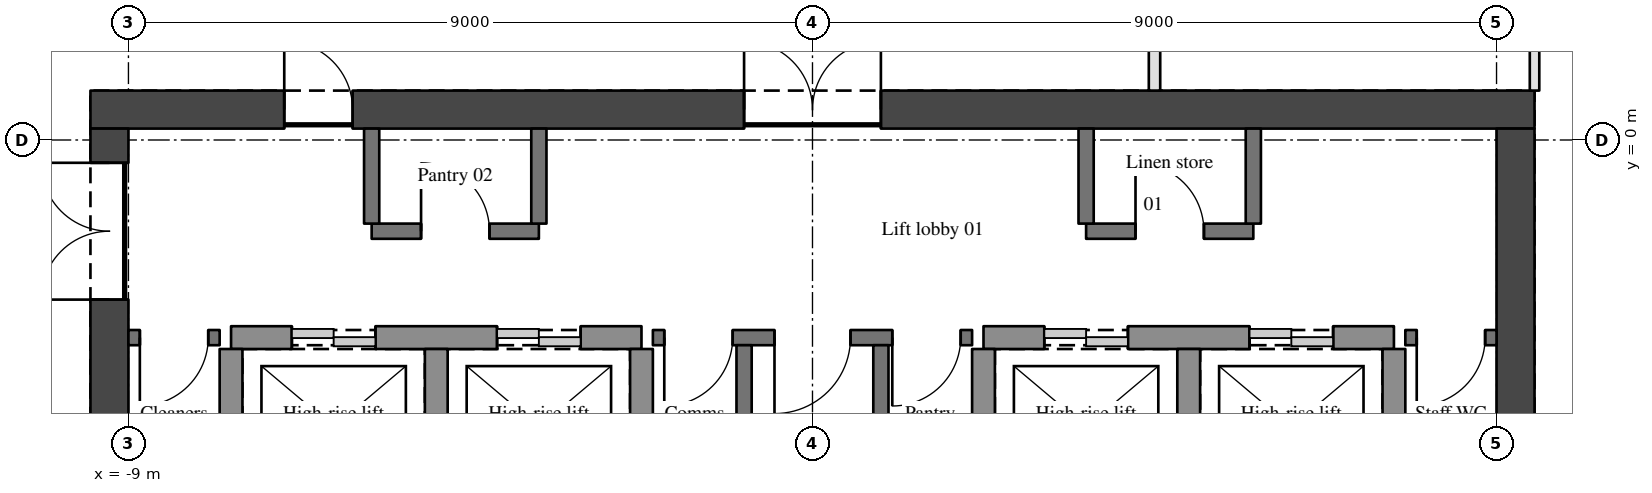
"""IFC4 building model, lengths in metres.
Left out: names, types, materials, properties, quantities, classifications, styles, units other than length and angle.
Written with IfcOpenShell. Run it as: python <this file> out.ifc"""

import sys

from ifc_helpers import new_model, si_unit, direction, frame, frame_2d, origin, place, context, subcontext, project, spatial, rectangle, extrude, element, fill, save


model = new_model("IFC4")
c1 = context("Model", 3, precision=1e-05, world=origin(), true_north=direction((0.0, 1.0)))
c2 = subcontext(c1, "Body", "Model", "MODEL_VIEW")
j1 = project(units=[si_unit("LENGTHUNIT", "METRE"), si_unit("PLANEANGLEUNIT", "RADIAN")], contexts=[c1])
p1 = place(None, origin())
s1 = spatial("IfcSite", under=j1, at=p1, CompositionType="ELEMENT")
p2 = place(p1, origin())
s2 = spatial("IfcBuilding", under=s1, at=p2, CompositionType="ELEMENT")
p3 = place(p2, frame((0.0, 0.0, 217.2)))
s3 = spatial("IfcBuildingStorey", under=s2, at=p3, CompositionType="ELEMENT", Elevation=217.2)
p4 = place(p3, frame((-9.5, 0.4, 0.0), z_axis=(0.0, 0.0, 1.0), x_axis=(1.0, 0.0, 0.0)))
e1 = element("IfcWall", 1, at=p4, inside=s3, PredefinedType="SHEAR", context=c2, shape_type="SweptSolid", body=[
    extrude(rectangle(XDim=19.0, YDim=0.5, at=frame_2d((9.5, 0.0))), origin(), (0.0, 0.0, 1.0), 3.15),
])
p5 = place(p4, frame((8.6, 0.0, 0.0)))
e2 = element("IfcOpeningElement", 2, at=p5, cuts=e1, PredefinedType="OPENING", context=c2, shape_type="SweptSolid", body=[
    extrude(rectangle(XDim=1.8, YDim=2.1, at=frame_2d((0.9, 1.05))), frame((0.0, 0.26, 0.0), z_axis=(0.0, -1.0, 0.0), x_axis=(1.0, 0.0, 0.0)), (0.0, 0.0, 1.0), 0.52),
])
p6 = place(p4, frame((2.55, 0.0, 0.0)))
e3 = element("IfcOpeningElement", 3, at=p6, cuts=e1, PredefinedType="OPENING", context=c2, shape_type="SweptSolid", body=[
    extrude(rectangle(XDim=0.9, YDim=2.1, at=frame_2d((0.45, 1.05))), frame((0.0, 0.26, 0.0), z_axis=(0.0, -1.0, 0.0), x_axis=(1.0, 0.0, 0.0)), (0.0, 0.0, 1.0), 0.52),
])
p7 = place(p3, frame((-9.25, -11.5, 0.0), z_axis=(0.0, 0.0, 1.0), x_axis=(0.0, 1.0, 0.0)))
e4 = element("IfcWall", 4, at=p7, inside=s3, PredefinedType="SHEAR", context=c2, shape_type="SweptSolid", body=[
    extrude(rectangle(XDim=11.65, YDim=0.5, at=frame_2d((5.825, 0.0))), origin(), (0.0, 0.0, 1.0), 3.15),
])
p8 = place(p7, frame((9.4, 0.0, 0.0)))
e5 = element("IfcOpeningElement", 5, at=p8, cuts=e4, PredefinedType="OPENING", context=c2, shape_type="SweptSolid", body=[
    extrude(rectangle(XDim=1.8, YDim=2.1, at=frame_2d((0.9, 1.05))), frame((0.0, 0.26, 0.0), z_axis=(0.0, -1.0, 0.0), x_axis=(1.0, 0.0, 0.0)), (0.0, 0.0, 1.0), 0.52),
])
p9 = place(p3, frame((9.25, -11.5, 0.0), z_axis=(0.0, 0.0, 1.0), x_axis=(0.0, 1.0, 0.0)))
e6 = element("IfcWall", 6, at=p9, inside=s3, PredefinedType="SHEAR", context=c2, shape_type="SweptSolid", body=[
    extrude(rectangle(XDim=11.65, YDim=0.5, at=frame_2d((5.825, 0.0))), origin(), (0.0, 0.0, 1.0), 3.15),
])
p10 = place(p3, frame((-7.8, -2.6, 0.0), z_axis=(0.0, 0.0, 1.0), x_axis=(-1.0, 0.0, 0.0)))
e7 = element("IfcWall", 7, at=p10, inside=s3, PredefinedType="SOLIDWALL", context=c2, shape_type="SweptSolid", body=[
    extrude(rectangle(XDim=1.2, YDim=0.2, at=frame_2d((0.6, 0.0))), origin(), (0.0, 0.0, 1.0), 2.85),
])
p11 = place(p10, frame((0.15, 0.0, 0.0)))
e8 = element("IfcOpeningElement", 8, at=p11, cuts=e7, PredefinedType="OPENING", context=c2, shape_type="SweptSolid", body=[
    extrude(rectangle(XDim=0.9, YDim=2.1, at=frame_2d((0.45, 1.05))), frame((0.0, 0.11, 0.0), z_axis=(0.0, -1.0, 0.0), x_axis=(1.0, 0.0, 0.0)), (0.0, 0.0, 1.0), 0.22),
])
p12 = place(p3, frame((-7.65, -2.6, 0.0), z_axis=(0.0, 0.0, 1.0), x_axis=(1.0, 0.0, 0.0)))
e9 = element("IfcWall", 9, at=p12, inside=s3, PredefinedType="SHEAR", context=c2, shape_type="SweptSolid", body=[
    extrude(rectangle(XDim=5.4, YDim=0.3, at=frame_2d((2.7, 0.0))), origin(), (0.0, 0.0, 1.0), 3.15),
])
p13 = place(p12, frame((0.8, 0.0, 0.0)))
e10 = element("IfcOpeningElement", 10, at=p13, cuts=e9, PredefinedType="OPENING", context=c2, shape_type="SweptSolid", body=[
    extrude(rectangle(XDim=1.1, YDim=2.1, at=frame_2d((0.55, 1.05))), frame((0.0, 0.16, 0.0), z_axis=(0.0, -1.0, 0.0), x_axis=(1.0, 0.0, 0.0)), (0.0, 0.0, 1.0), 0.32),
])
p14 = place(p12, frame((3.5, 0.0, 0.0)))
e11 = element("IfcOpeningElement", 11, at=p14, cuts=e9, PredefinedType="OPENING", context=c2, shape_type="SweptSolid", body=[
    extrude(rectangle(XDim=1.1, YDim=2.1, at=frame_2d((0.55, 1.05))), frame((0.0, 0.16, 0.0), z_axis=(0.0, -1.0, 0.0), x_axis=(1.0, 0.0, 0.0)), (0.0, 0.0, 1.0), 0.32),
])
p15 = place(p3, frame((2.1, -2.6, 0.0), z_axis=(0.0, 0.0, 1.0), x_axis=(-1.0, 0.0, 0.0)))
e12 = element("IfcWall", 12, at=p15, inside=s3, PredefinedType="SOLIDWALL", context=c2, shape_type="SweptSolid", body=[
    extrude(rectangle(XDim=4.2, YDim=0.2, at=frame_2d((2.1, 0.0))), origin(), (0.0, 0.0, 1.0), 2.85),
])
p16 = place(p15, frame((1.6, 0.0, 0.0)))
e13 = element("IfcOpeningElement", 13, at=p16, cuts=e12, PredefinedType="OPENING", context=c2, shape_type="SweptSolid", body=[
    extrude(rectangle(XDim=1.0, YDim=2.1, at=frame_2d((0.5, 1.05))), frame((0.0, 0.11, 0.0), z_axis=(0.0, -1.0, 0.0), x_axis=(1.0, 0.0, 0.0)), (0.0, 0.0, 1.0), 0.22),
])
p17 = place(p15, frame((3.15, 0.0, 0.0)))
e14 = element("IfcOpeningElement", 14, at=p17, cuts=e12, PredefinedType="OPENING", context=c2, shape_type="SweptSolid", body=[
    extrude(rectangle(XDim=0.9, YDim=2.1, at=frame_2d((0.45, 1.05))), frame((0.0, 0.11, 0.0), z_axis=(0.0, -1.0, 0.0), x_axis=(1.0, 0.0, 0.0)), (0.0, 0.0, 1.0), 0.22),
])
p18 = place(p15, frame((0.15, 0.0, 0.0)))
e15 = element("IfcOpeningElement", 15, at=p18, cuts=e12, PredefinedType="OPENING", context=c2, shape_type="SweptSolid", body=[
    extrude(rectangle(XDim=0.9, YDim=2.1, at=frame_2d((0.45, 1.05))), frame((0.0, 0.11, 0.0), z_axis=(0.0, -1.0, 0.0), x_axis=(1.0, 0.0, 0.0)), (0.0, 0.0, 1.0), 0.22),
])
p19 = place(p3, frame((2.25, -2.6, 0.0), z_axis=(0.0, 0.0, 1.0), x_axis=(1.0, 0.0, 0.0)))
e16 = element("IfcWall", 16, at=p19, inside=s3, PredefinedType="SHEAR", context=c2, shape_type="SweptSolid", body=[
    extrude(rectangle(XDim=5.4, YDim=0.3, at=frame_2d((2.7, 0.0))), origin(), (0.0, 0.0, 1.0), 3.15),
])
p20 = place(p19, frame((0.8, 0.0, 0.0)))
e17 = element("IfcOpeningElement", 17, at=p20, cuts=e16, PredefinedType="OPENING", context=c2, shape_type="SweptSolid", body=[
    extrude(rectangle(XDim=1.1, YDim=2.1, at=frame_2d((0.55, 1.05))), frame((0.0, 0.16, 0.0), z_axis=(0.0, -1.0, 0.0), x_axis=(1.0, 0.0, 0.0)), (0.0, 0.0, 1.0), 0.32),
])
p21 = place(p19, frame((3.5, 0.0, 0.0)))
e18 = element("IfcOpeningElement", 18, at=p21, cuts=e16, PredefinedType="OPENING", context=c2, shape_type="SweptSolid", body=[
    extrude(rectangle(XDim=1.1, YDim=2.1, at=frame_2d((0.55, 1.05))), frame((0.0, 0.16, 0.0), z_axis=(0.0, -1.0, 0.0), x_axis=(1.0, 0.0, 0.0)), (0.0, 0.0, 1.0), 0.32),
])
p22 = place(p3, frame((9.0, -2.6, 0.0), z_axis=(0.0, 0.0, 1.0), x_axis=(-1.0, 0.0, 0.0)))
e19 = element("IfcWall", 19, at=p22, inside=s3, PredefinedType="SOLIDWALL", context=c2, shape_type="SweptSolid", body=[
    extrude(rectangle(XDim=1.2, YDim=0.2, at=frame_2d((0.6, 0.0))), origin(), (0.0, 0.0, 1.0), 2.85),
])
p23 = place(p22, frame((0.15, 0.0, 0.0)))
e20 = element("IfcOpeningElement", 20, at=p23, cuts=e19, PredefinedType="OPENING", context=c2, shape_type="SweptSolid", body=[
    extrude(rectangle(XDim=0.9, YDim=2.1, at=frame_2d((0.45, 1.05))), frame((0.0, 0.11, 0.0), z_axis=(0.0, -1.0, 0.0), x_axis=(1.0, 0.0, 0.0)), (0.0, 0.0, 1.0), 0.22),
])
p24 = place(p3, frame((-5.8, -1.2, 0.0), z_axis=(0.0, 0.0, 1.0), x_axis=(1.0, 0.0, 0.0)))
e21 = element("IfcWall", 21, at=p24, inside=s3, PredefinedType="SOLIDWALL", context=c2, shape_type="SweptSolid", body=[
    extrude(rectangle(XDim=2.2, YDim=0.2, at=frame_2d((1.1, 0.0))), origin(), (0.0, 0.0, 1.0), 2.85),
])
p25 = place(p24, frame((0.65, 0.0, 0.0)))
e22 = element("IfcOpeningElement", 22, at=p25, cuts=e21, PredefinedType="OPENING", context=c2, shape_type="SweptSolid", body=[
    extrude(rectangle(XDim=0.9, YDim=2.1, at=frame_2d((0.45, 1.05))), frame((0.0, 0.11, 0.0), z_axis=(0.0, -1.0, 0.0), x_axis=(1.0, 0.0, 0.0)), (0.0, 0.0, 1.0), 0.22),
])
p26 = place(p3, frame((3.6, -1.2, 0.0), z_axis=(0.0, 0.0, 1.0), x_axis=(1.0, 0.0, 0.0)))
e23 = element("IfcWall", 23, at=p26, inside=s3, PredefinedType="SOLIDWALL", context=c2, shape_type="SweptSolid", body=[
    extrude(rectangle(XDim=2.2, YDim=0.2, at=frame_2d((1.1, 0.0))), origin(), (0.0, 0.0, 1.0), 2.85),
])
p27 = place(p26, frame((0.65, 0.0, 0.0)))
e24 = element("IfcOpeningElement", 24, at=p27, cuts=e23, PredefinedType="OPENING", context=c2, shape_type="SweptSolid", body=[
    extrude(rectangle(XDim=0.9, YDim=2.1, at=frame_2d((0.45, 1.05))), frame((0.0, 0.11, 0.0), z_axis=(0.0, -1.0, 0.0), x_axis=(1.0, 0.0, 0.0)), (0.0, 0.0, 1.0), 0.22),
])
p28 = place(p3, frame((-7.65, -4.8, 0.0), z_axis=(0.0, 0.0, 1.0), x_axis=(0.0, 1.0, 0.0)))
e25 = element("IfcWall", 25, at=p28, inside=s3, PredefinedType="SHEAR", context=c2, shape_type="SweptSolid", body=[
    extrude(rectangle(XDim=2.05, YDim=0.3, at=frame_2d((1.025, 0.0))), origin(), (0.0, 0.0, 1.0), 3.15),
])
p29 = place(p3, frame((-5.8, -1.1, 0.0), z_axis=(0.0, 0.0, 1.0), x_axis=(0.0, 1.0, 0.0)))
e26 = element("IfcWall", 26, at=p29, inside=s3, PredefinedType="SOLIDWALL", context=c2, shape_type="SweptSolid", body=[
    extrude(rectangle(XDim=1.25, YDim=0.2, at=frame_2d((0.625, 0.0))), origin(), (0.0, 0.0, 1.0), 2.85),
])
p30 = place(p3, frame((-4.95, -4.8, 0.0), z_axis=(0.0, 0.0, 1.0), x_axis=(0.0, 1.0, 0.0)))
e27 = element("IfcWall", 27, at=p30, inside=s3, PredefinedType="SHEAR", context=c2, shape_type="SweptSolid", body=[
    extrude(rectangle(XDim=2.05, YDim=0.3, at=frame_2d((1.025, 0.0))), origin(), (0.0, 0.0, 1.0), 3.15),
])
p31 = place(p3, frame((-3.6, -1.1, 0.0), z_axis=(0.0, 0.0, 1.0), x_axis=(0.0, 1.0, 0.0)))
e28 = element("IfcWall", 28, at=p31, inside=s3, PredefinedType="SOLIDWALL", context=c2, shape_type="SweptSolid", body=[
    extrude(rectangle(XDim=1.25, YDim=0.2, at=frame_2d((0.625, 0.0))), origin(), (0.0, 0.0, 1.0), 2.85),
])
p32 = place(p3, frame((-2.25, -4.8, 0.0), z_axis=(0.0, 0.0, 1.0), x_axis=(0.0, 1.0, 0.0)))
e29 = element("IfcWall", 29, at=p32, inside=s3, PredefinedType="SHEAR", context=c2, shape_type="SweptSolid", body=[
    extrude(rectangle(XDim=2.05, YDim=0.3, at=frame_2d((1.025, 0.0))), origin(), (0.0, 0.0, 1.0), 3.15),
])
for number, where, z_axis, x_axis in (
    (30, (-0.9, -4.85, 0.0), (0.0, 0.0, 1.0), (0.0, 1.0, 0.0)),
    (31, (0.9, -4.85, 0.0), (0.0, 0.0, 1.0), (0.0, 1.0, 0.0)),
):
    element("IfcWall", number, at=place(p3, frame(where, z_axis=z_axis, x_axis=x_axis)), inside=s3, PredefinedType="SOLIDWALL", context=c2, shape_type="SweptSolid", body=[
        extrude(rectangle(XDim=2.15, YDim=0.2, at=frame_2d((1.075, 0.0))), origin(), (0.0, 0.0, 1.0), 2.85),
    ])
p33 = place(p3, frame((2.25, -4.8, 0.0), z_axis=(0.0, 0.0, 1.0), x_axis=(0.0, 1.0, 0.0)))
e32 = element("IfcWall", 32, at=p33, inside=s3, PredefinedType="SHEAR", context=c2, shape_type="SweptSolid", body=[
    extrude(rectangle(XDim=2.05, YDim=0.3, at=frame_2d((1.025, 0.0))), origin(), (0.0, 0.0, 1.0), 3.15),
])
p34 = place(p3, frame((3.6, -1.1, 0.0), z_axis=(0.0, 0.0, 1.0), x_axis=(0.0, 1.0, 0.0)))
e33 = element("IfcWall", 33, at=p34, inside=s3, PredefinedType="SOLIDWALL", context=c2, shape_type="SweptSolid", body=[
    extrude(rectangle(XDim=1.25, YDim=0.2, at=frame_2d((0.625, 0.0))), origin(), (0.0, 0.0, 1.0), 2.85),
])
p35 = place(p3, frame((4.5, 5.325, 0.0), z_axis=(0.0, 0.0, 1.0), x_axis=(0.0, -1.0, 0.0)))
e34 = element("IfcWall", 34, at=p35, inside=s3, PredefinedType="PARTITIONING", context=c2, shape_type="SweptSolid", body=[
    extrude(rectangle(XDim=4.675, YDim=0.15, at=frame_2d((2.337, 0.0))), origin(), (0.0, 0.0, 1.0), 2.21),
])
p36 = place(p35, frame((1.85, 0.0, 0.0)))
e35 = element("IfcOpeningElement", 35, at=p36, cuts=e34, PredefinedType="OPENING", context=c2, shape_type="SweptSolid", body=[
    extrude(rectangle(XDim=0.9, YDim=2.1, at=frame_2d((0.45, 1.05))), frame((0.0, 0.085, 0.0), z_axis=(0.0, -1.0, 0.0), x_axis=(1.0, 0.0, 0.0)), (0.0, 0.0, 1.0), 0.17),
])
p37 = place(p3, frame((4.95, -4.8, 0.0), z_axis=(0.0, 0.0, 1.0), x_axis=(0.0, 1.0, 0.0)))
e36 = element("IfcWall", 36, at=p37, inside=s3, PredefinedType="SHEAR", context=c2, shape_type="SweptSolid", body=[
    extrude(rectangle(XDim=2.05, YDim=0.3, at=frame_2d((1.025, 0.0))), origin(), (0.0, 0.0, 1.0), 3.15),
])
p38 = place(p3, frame((5.8, -1.1, 0.0), z_axis=(0.0, 0.0, 1.0), x_axis=(0.0, 1.0, 0.0)))
e37 = element("IfcWall", 37, at=p38, inside=s3, PredefinedType="SOLIDWALL", context=c2, shape_type="SweptSolid", body=[
    extrude(rectangle(XDim=1.25, YDim=0.2, at=frame_2d((0.625, 0.0))), origin(), (0.0, 0.0, 1.0), 2.85),
])
p39 = place(p3, frame((7.65, -4.8, 0.0), z_axis=(0.0, 0.0, 1.0), x_axis=(0.0, 1.0, 0.0)))
e38 = element("IfcWall", 38, at=p39, inside=s3, PredefinedType="SHEAR", context=c2, shape_type="SweptSolid", body=[
    extrude(rectangle(XDim=2.05, YDim=0.3, at=frame_2d((1.025, 0.0))), origin(), (0.0, 0.0, 1.0), 3.15),
])
p40 = place(p3, frame((9.5, 0.65, 0.0), z_axis=(0.0, 0.0, 1.0), x_axis=(0.0, 1.0, 0.0)))
e39 = element("IfcWall", 39, at=p40, inside=s3, PredefinedType="PARTITIONING", context=c2, shape_type="SweptSolid", body=[
    extrude(rectangle(XDim=8.85, YDim=0.125, at=frame_2d((4.425, 0.0))), origin(), (0.0, 0.0, 1.0), 2.21),
])
p41 = place(p8, origin())
e40 = element("IfcDoor", 40, at=p41, inside=s3, OperationType="DOUBLE_DOOR_SINGLE_SWING", PredefinedType="DOOR", context=c2, shape_type="SweptSolid", body=[
    extrude(rectangle(XDim=1.8, YDim=2.1, at=frame_2d((0.9, 1.05))), frame((0.0, 0.025, 0.0), z_axis=(0.0, -1.0, 0.0), x_axis=(1.0, 0.0, 0.0)), (0.0, 0.0, 1.0), 0.05),
])
fill(e5, e40)
p42 = place(p5, origin())
e41 = element("IfcDoor", 41, at=p42, inside=s3, OperationType="DOUBLE_DOOR_SINGLE_SWING", PredefinedType="DOOR", context=c2, shape_type="SweptSolid", body=[
    extrude(rectangle(XDim=1.8, YDim=2.1, at=frame_2d((0.9, 1.05))), frame((0.0, 0.025, 0.0), z_axis=(0.0, -1.0, 0.0), x_axis=(1.0, 0.0, 0.0)), (0.0, 0.0, 1.0), 0.05),
])
fill(e2, e41)
p43 = place(p16, origin())
e42 = element("IfcDoor", 42, at=p43, inside=s3, OperationType="SINGLE_SWING_RIGHT", PredefinedType="DOOR", context=c2, shape_type="SweptSolid", body=[
    extrude(rectangle(XDim=1.0, YDim=2.1, at=frame_2d((0.5, 1.05))), frame((0.0, 0.025, 0.0), z_axis=(0.0, -1.0, 0.0), x_axis=(1.0, 0.0, 0.0)), (0.0, 0.0, 1.0), 0.05),
])
fill(e13, e42)
p44 = place(p17, origin())
e43 = element("IfcDoor", 43, at=p44, inside=s3, OperationType="SINGLE_SWING_RIGHT", PredefinedType="DOOR", context=c2, shape_type="SweptSolid", body=[
    extrude(rectangle(XDim=0.9, YDim=2.1, at=frame_2d((0.45, 1.05))), frame((0.0, 0.025, 0.0), z_axis=(0.0, -1.0, 0.0), x_axis=(1.0, 0.0, 0.0)), (0.0, 0.0, 1.0), 0.05),
])
fill(e14, e43)
p45 = place(p18, origin())
e44 = element("IfcDoor", 44, at=p45, inside=s3, OperationType="SINGLE_SWING_RIGHT", PredefinedType="DOOR", context=c2, shape_type="SweptSolid", body=[
    extrude(rectangle(XDim=0.9, YDim=2.1, at=frame_2d((0.45, 1.05))), frame((0.0, 0.025, 0.0), z_axis=(0.0, -1.0, 0.0), x_axis=(1.0, 0.0, 0.0)), (0.0, 0.0, 1.0), 0.05),
])
fill(e15, e44)
p46 = place(p23, origin())
e45 = element("IfcDoor", 45, at=p46, inside=s3, OperationType="SINGLE_SWING_RIGHT", PredefinedType="DOOR", context=c2, shape_type="SweptSolid", body=[
    extrude(rectangle(XDim=0.9, YDim=2.1, at=frame_2d((0.45, 1.05))), frame((0.0, 0.025, 0.0), z_axis=(0.0, -1.0, 0.0), x_axis=(1.0, 0.0, 0.0)), (0.0, 0.0, 1.0), 0.05),
])
fill(e20, e45)
p47 = place(p11, origin())
e46 = element("IfcDoor", 46, at=p47, inside=s3, OperationType="SINGLE_SWING_RIGHT", PredefinedType="DOOR", context=c2, shape_type="SweptSolid", body=[
    extrude(rectangle(XDim=0.9, YDim=2.1, at=frame_2d((0.45, 1.05))), frame((0.0, 0.025, 0.0), z_axis=(0.0, -1.0, 0.0), x_axis=(1.0, 0.0, 0.0)), (0.0, 0.0, 1.0), 0.05),
])
fill(e8, e46)
p48 = place(p6, origin())
e47 = element("IfcDoor", 47, at=p48, inside=s3, OperationType="SINGLE_SWING_LEFT", PredefinedType="DOOR", context=c2, shape_type="SweptSolid", body=[
    extrude(rectangle(XDim=0.9, YDim=2.1, at=frame_2d((0.45, 1.05))), frame((0.0, 0.025, 0.0), z_axis=(0.0, -1.0, 0.0), x_axis=(1.0, 0.0, 0.0)), (0.0, 0.0, 1.0), 0.05),
])
fill(e3, e47)
p49 = place(p25, origin())
e48 = element("IfcDoor", 48, at=p49, inside=s3, OperationType="SINGLE_SWING_LEFT", PredefinedType="DOOR", context=c2, shape_type="SweptSolid", body=[
    extrude(rectangle(XDim=0.9, YDim=2.1, at=frame_2d((0.45, 1.05))), frame((0.0, 0.025, 0.0), z_axis=(0.0, -1.0, 0.0), x_axis=(1.0, 0.0, 0.0)), (0.0, 0.0, 1.0), 0.05),
])
fill(e22, e48)
p50 = place(p27, origin())
e49 = element("IfcDoor", 49, at=p50, inside=s3, OperationType="SINGLE_SWING_LEFT", PredefinedType="DOOR", context=c2, shape_type="SweptSolid", body=[
    extrude(rectangle(XDim=0.9, YDim=2.1, at=frame_2d((0.45, 1.05))), frame((0.0, 0.025, 0.0), z_axis=(0.0, -1.0, 0.0), x_axis=(1.0, 0.0, 0.0)), (0.0, 0.0, 1.0), 0.05),
])
fill(e24, e49)
p51 = place(p13, origin())
e50 = element("IfcDoor", 50, at=p51, inside=s3, OperationType="DOUBLE_DOOR_SLIDING", PredefinedType="DOOR", context=c2, shape_type="SweptSolid", body=[
    extrude(rectangle(XDim=1.1, YDim=2.1, at=frame_2d((0.55, 1.05))), frame((0.0, 0.025, 0.0), z_axis=(0.0, -1.0, 0.0), x_axis=(1.0, 0.0, 0.0)), (0.0, 0.0, 1.0), 0.05),
])
fill(e10, e50)
p52 = place(p14, origin())
e51 = element("IfcDoor", 51, at=p52, inside=s3, OperationType="DOUBLE_DOOR_SLIDING", PredefinedType="DOOR", context=c2, shape_type="SweptSolid", body=[
    extrude(rectangle(XDim=1.1, YDim=2.1, at=frame_2d((0.55, 1.05))), frame((0.0, 0.025, 0.0), z_axis=(0.0, -1.0, 0.0), x_axis=(1.0, 0.0, 0.0)), (0.0, 0.0, 1.0), 0.05),
])
fill(e11, e51)
p53 = place(p20, origin())
e52 = element("IfcDoor", 52, at=p53, inside=s3, OperationType="DOUBLE_DOOR_SLIDING", PredefinedType="DOOR", context=c2, shape_type="SweptSolid", body=[
    extrude(rectangle(XDim=1.1, YDim=2.1, at=frame_2d((0.55, 1.05))), frame((0.0, 0.025, 0.0), z_axis=(0.0, -1.0, 0.0), x_axis=(1.0, 0.0, 0.0)), (0.0, 0.0, 1.0), 0.05),
])
fill(e17, e52)
p54 = place(p21, origin())
e53 = element("IfcDoor", 53, at=p54, inside=s3, OperationType="DOUBLE_DOOR_SLIDING", PredefinedType="DOOR", context=c2, shape_type="SweptSolid", body=[
    extrude(rectangle(XDim=1.1, YDim=2.1, at=frame_2d((0.55, 1.05))), frame((0.0, 0.025, 0.0), z_axis=(0.0, -1.0, 0.0), x_axis=(1.0, 0.0, 0.0)), (0.0, 0.0, 1.0), 0.05),
])
fill(e18, e53)
save(model, sys.argv[1])
